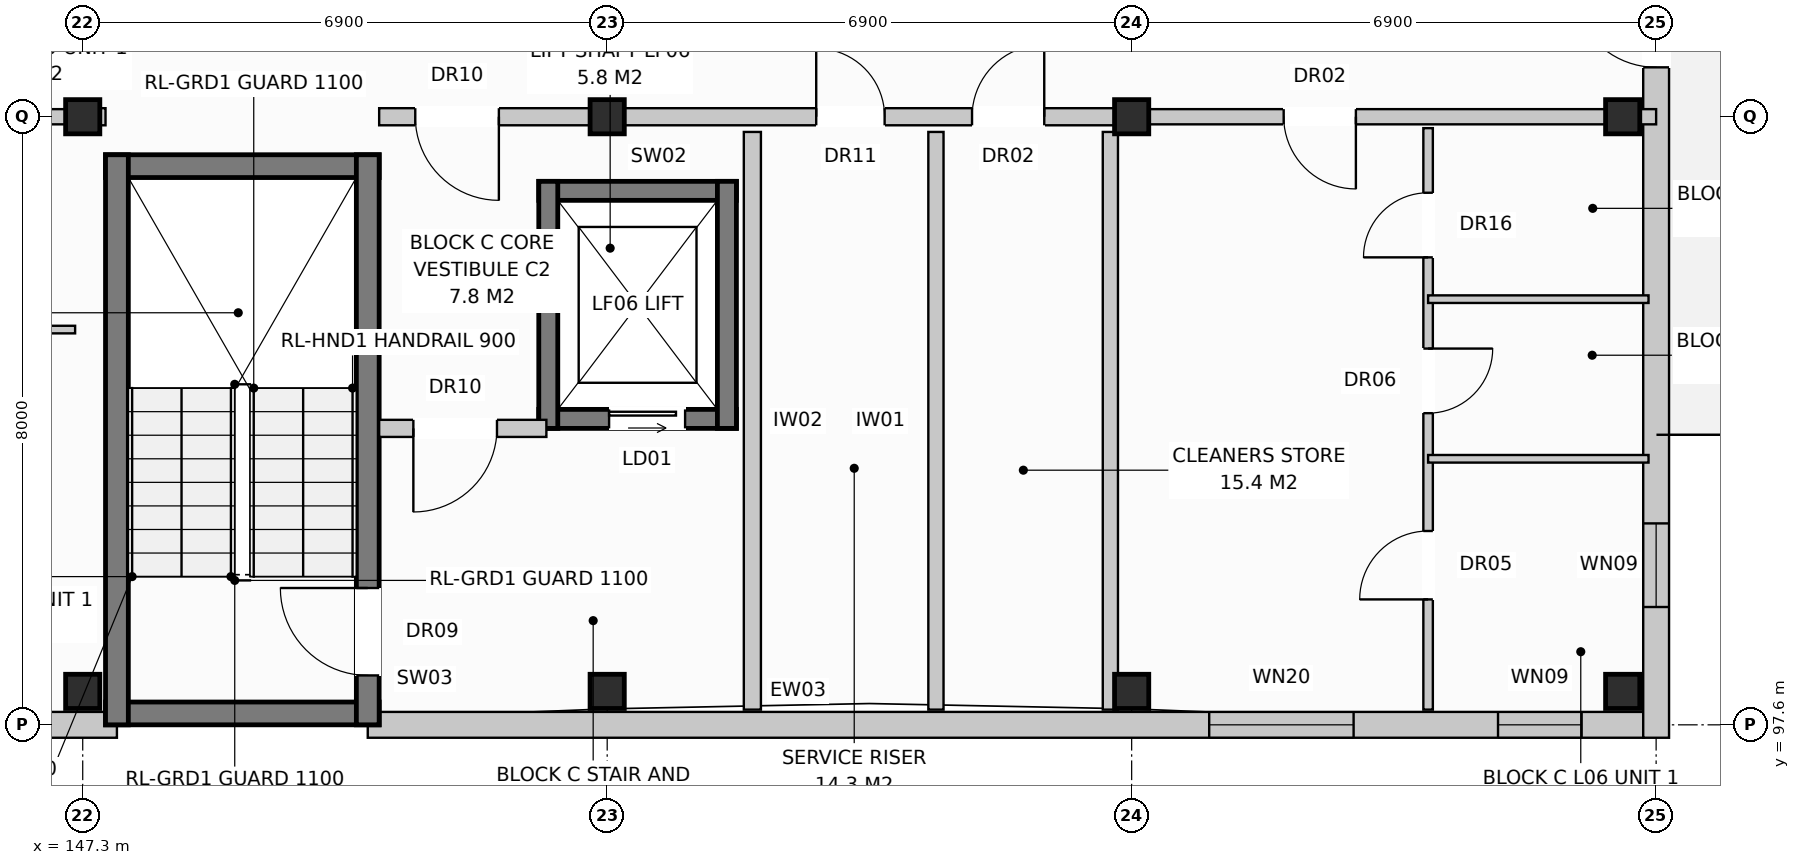
"""IFC4 building model, lengths in metres.
Left out: names, types, materials, properties, quantities, classifications, styles, units other than length and angle.
Written with IfcOpenShell. Run it as: python <this file> out.ifc"""

import sys

from ifc_helpers import new_model, si_unit, direction, frame, frame_2d, origin, origin_with_axes, origin_2d, place, context, subcontext, project, spatial, rectangle, extrude, element, fill, save


model = new_model("IFC4")
c1 = context("Model", 3, precision=1e-05, world=origin(), true_north=direction((0.0, 1.0)))
c2 = subcontext(c1, "Body", "Model", "MODEL_VIEW")
j1 = project(units=[si_unit("LENGTHUNIT", "METRE"), si_unit("PLANEANGLEUNIT", "RADIAN")], contexts=[c1])
p1 = place(None, origin())
s1 = spatial("IfcSite", under=j1, at=p1, CompositionType="ELEMENT")
p2 = place(p1, origin())
s2 = spatial("IfcBuilding", under=s1, at=p2, CompositionType="ELEMENT")
p3 = place(p2, frame((0.0, 0.0, 20.8)))
s3 = spatial("IfcBuildingStorey", under=s2, at=p3, CompositionType="ELEMENT", Elevation=20.8)
for number, where, z_axis, x_axis in (
    (1, (147.3, 98.04, 0.0), (0.0, 0.0, 1.0), (1.0, 0.0, 0.0)),
    (2, (147.3, 105.6, 0.0), (0.0, 0.0, 1.0), (1.0, 0.0, 0.0)),
    (3, (154.2, 98.04, 0.0), (0.0, 0.0, 1.0), (1.0, 0.0, 0.0)),
    (4, (154.2, 105.6, 0.0), (0.0, 0.0, 1.0), (1.0, 0.0, 0.0)),
    (5, (161.1, 98.04, 0.0), (0.0, 0.0, 1.0), (1.0, 0.0, 0.0)),
    (6, (161.1, 105.6, 0.0), (0.0, 0.0, 1.0), (1.0, 0.0, 0.0)),
    (7, (167.56, 98.04, 0.0), (0.0, 0.0, 1.0), (1.0, 0.0, 0.0)),
    (8, (167.56, 105.6, 0.0), (0.0, 0.0, 1.0), (1.0, 0.0, 0.0)),
):
    element("IfcColumn", number, at=place(p3, frame(where, z_axis=z_axis, x_axis=x_axis)), inside=s3, PredefinedType="COLUMN", context=c2, shape_type="SweptSolid", body=[
        extrude(rectangle(XDim=0.45, YDim=0.45, at=origin_2d()), origin(), (0.0, 0.0, 1.0), 3.2),
    ])
p4 = place(p3, frame((130.35, 97.6, 0.0), z_axis=(0.0, 0.0, 1.0), x_axis=(1.0, 0.0, 0.0)))
e9 = element("IfcWall", 9, at=p4, inside=s3, PredefinedType="STANDARD", context=c2, shape_type="SweptSolid", body=[
    extrude(rectangle(XDim=17.4, YDim=0.34, at=frame_2d((8.7, 0.0))), origin(), (0.0, 0.0, 1.0), 2.95),
])
p5 = place(p4, frame((11.82, 0.0, 0.0)))
e10 = element("IfcOpeningElement", 10, at=p5, cuts=e9, PredefinedType="OPENING", context=c2, shape_type="SweptSolid", body=[
    extrude(rectangle(XDim=1.05, YDim=2.12, at=frame_2d((0.525, 1.06))), frame((0.0, 0.182, 0.0), z_axis=(0.0, -1.0, 0.0), x_axis=(1.0, 0.0, 0.0)), (0.0, 0.0, 1.0), 0.364),
])
p6 = place(p4, frame((14.97, 0.0, 0.72)))
e11 = element("IfcOpeningElement", 11, at=p6, cuts=e9, PredefinedType="OPENING", context=c2, shape_type="SweptSolid", body=[
    extrude(rectangle(XDim=1.1, YDim=1.5, at=frame_2d((0.55, 0.75))), frame((0.0, 0.182, 0.0), z_axis=(0.0, -1.0, 0.0), x_axis=(1.0, 0.0, 0.0)), (0.0, 0.0, 1.0), 0.364),
])
p7 = place(p3, frame((151.05, 97.6, 0.0), z_axis=(0.0, 0.0, 1.0), x_axis=(1.0, 0.0, 0.0)))
e12 = element("IfcWall", 12, at=p7, inside=s3, PredefinedType="STANDARD", context=c2, shape_type="SweptSolid", body=[
    extrude(rectangle(XDim=16.79, YDim=0.34, at=frame_2d((8.395, 0.0))), origin(), (0.0, 0.0, 1.0), 2.95),
])
p8 = place(p7, frame((11.07, 0.0, 0.8)))
e13 = element("IfcOpeningElement", 13, at=p8, cuts=e12, PredefinedType="OPENING", context=c2, shape_type="SweptSolid", body=[
    extrude(rectangle(XDim=1.9, YDim=1.85, at=frame_2d((0.95, 0.925))), frame((0.0, 0.182, 0.0), z_axis=(0.0, -1.0, 0.0), x_axis=(1.0, 0.0, 0.0)), (0.0, 0.0, 1.0), 0.364),
])
p9 = place(p7, frame((14.87, 0.0, 0.72)))
e14 = element("IfcOpeningElement", 14, at=p9, cuts=e12, PredefinedType="OPENING", context=c2, shape_type="SweptSolid", body=[
    extrude(rectangle(XDim=1.1, YDim=1.5, at=frame_2d((0.55, 0.75))), frame((0.0, 0.182, 0.0), z_axis=(0.0, -1.0, 0.0), x_axis=(1.0, 0.0, 0.0)), (0.0, 0.0, 1.0), 0.364),
])
p10 = place(p3, frame((168.0, 97.43, 0.0), z_axis=(0.0, 0.0, 1.0), x_axis=(0.0, 1.0, 0.0)))
e15 = element("IfcWall", 15, at=p10, inside=s3, PredefinedType="STANDARD", context=c2, shape_type="SweptSolid", body=[
    extrude(rectangle(XDim=18.74, YDim=0.34, at=frame_2d((9.37, 0.0))), origin(), (0.0, 0.0, 1.0), 2.95),
])
p11 = place(p10, frame((8.82, 0.0, 0.0)))
e16 = element("IfcOpeningElement", 16, at=p11, cuts=e15, PredefinedType="OPENING", context=c2, shape_type="SweptSolid", body=[
    extrude(rectangle(XDim=1.1, YDim=2.1, at=frame_2d((0.55, 1.05))), frame((0.0, 0.182, 0.0), z_axis=(0.0, -1.0, 0.0), x_axis=(1.0, 0.0, 0.0)), (0.0, 0.0, 1.0), 0.364),
])
p12 = place(p10, frame((1.72, 0.0, 0.72)))
e17 = element("IfcOpeningElement", 17, at=p12, cuts=e15, PredefinedType="OPENING", context=c2, shape_type="SweptSolid", body=[
    extrude(rectangle(XDim=1.1, YDim=1.5, at=frame_2d((0.55, 0.75))), frame((0.0, 0.182, 0.0), z_axis=(0.0, -1.0, 0.0), x_axis=(1.0, 0.0, 0.0)), (0.0, 0.0, 1.0), 0.364),
])
p13 = place(p10, frame((15.92, 0.0, 0.72)))
e18 = element("IfcOpeningElement", 18, at=p13, cuts=e15, PredefinedType="OPENING", context=c2, shape_type="SweptSolid", body=[
    extrude(rectangle(XDim=1.1, YDim=1.5, at=frame_2d((0.55, 0.75))), frame((0.0, 0.182, 0.0), z_axis=(0.0, -1.0, 0.0), x_axis=(1.0, 0.0, 0.0)), (0.0, 0.0, 1.0), 0.364),
])
for number, where, z_axis, x_axis in (
    (19, (147.6, 97.75, 0.0), (0.0, 0.0, 1.0), (1.0, 0.0, 0.0)),
    (20, (147.6, 104.95, 0.0), (0.0, 0.0, 1.0), (1.0, 0.0, 0.0)),
):
    element("IfcWall", number, at=place(p3, frame(where, z_axis=z_axis, x_axis=x_axis)), inside=s3, PredefinedType="SHEAR", context=c2, shape_type="SweptSolid", body=[
        extrude(rectangle(XDim=3.6, YDim=0.3, at=frame_2d((1.8, 0.0))), origin(), (0.0, 0.0, 1.0), 2.95),
    ])
p14 = place(p3, frame((147.75, 97.6, 0.0), z_axis=(0.0, 0.0, 1.0), x_axis=(0.0, 1.0, 0.0)))
e21 = element("IfcWall", 21, at=p14, inside=s3, PredefinedType="SHEAR", context=c2, shape_type="SweptSolid", body=[
    extrude(rectangle(XDim=7.5, YDim=0.3, at=frame_2d((3.75, 0.0))), origin(), (0.0, 0.0, 1.0), 2.95),
])
p15 = place(p3, frame((151.05, 97.6, 0.0), z_axis=(0.0, 0.0, 1.0), x_axis=(0.0, 1.0, 0.0)))
e22 = element("IfcWall", 22, at=p15, inside=s3, PredefinedType="SHEAR", context=c2, shape_type="SweptSolid", body=[
    extrude(rectangle(XDim=7.5, YDim=0.3, at=frame_2d((3.75, 0.0))), origin(), (0.0, 0.0, 1.0), 2.95),
])
p16 = place(p15, frame((0.65, 0.0, 0.0)))
e23 = element("IfcOpeningElement", 23, at=p16, cuts=e22, PredefinedType="OPENING", context=c2, shape_type="SweptSolid", body=[
    extrude(rectangle(XDim=1.15, YDim=2.15, at=frame_2d((0.575, 1.075))), frame((0.0, 0.162, 0.0), z_axis=(0.0, -1.0, 0.0), x_axis=(1.0, 0.0, 0.0)), (0.0, 0.0, 1.0), 0.324),
])
p17 = place(p3, frame((153.3, 101.625, 0.0), z_axis=(0.0, 0.0, 1.0), x_axis=(1.0, 0.0, 0.0)))
e24 = element("IfcWall", 24, at=p17, inside=s3, PredefinedType="SHEAR", context=c2, shape_type="SweptSolid", body=[
    extrude(rectangle(XDim=2.6, YDim=0.25, at=frame_2d((1.3, 0.0))), origin(), (0.0, 0.0, 1.0), 2.95),
])
p18 = place(p17, frame((0.925, 0.0, 0.0)))
e25 = element("IfcOpeningElement", 25, at=p18, cuts=e24, PredefinedType="OPENING", context=c2, shape_type="SweptSolid", body=[
    extrude(rectangle(XDim=1.0, YDim=2.1, at=frame_2d((0.5, 1.05))), frame((0.0, 0.137, 0.0), z_axis=(0.0, -1.0, 0.0), x_axis=(1.0, 0.0, 0.0)), (0.0, 0.0, 1.0), 0.274),
])
p19 = place(p3, frame((153.3, 104.625, 0.0), z_axis=(0.0, 0.0, 1.0), x_axis=(1.0, 0.0, 0.0)))
e26 = element("IfcWall", 26, at=p19, inside=s3, PredefinedType="SHEAR", context=c2, shape_type="SweptSolid", body=[
    extrude(rectangle(XDim=2.6, YDim=0.25, at=frame_2d((1.3, 0.0))), origin(), (0.0, 0.0, 1.0), 2.95),
])
for number, where, z_axis, x_axis in (
    (27, (153.425, 101.5, 0.0), (0.0, 0.0, 1.0), (0.0, 1.0, 0.0)),
    (28, (155.775, 101.5, 0.0), (0.0, 0.0, 1.0), (0.0, 1.0, 0.0)),
):
    element("IfcWall", number, at=place(p3, frame(where, z_axis=z_axis, x_axis=x_axis)), inside=s3, PredefinedType="SHEAR", context=c2, shape_type="SweptSolid", body=[
        extrude(rectangle(XDim=3.25, YDim=0.25, at=frame_2d((1.625, 0.0))), origin(), (0.0, 0.0, 1.0), 2.95),
    ])
p20 = place(p3, frame((156.11, 97.8, 0.0), z_axis=(0.0, 0.0, 1.0), x_axis=(0.0, 1.0, 0.0)))
e29 = element("IfcWall", 29, at=p20, inside=s3, PredefinedType="PARTITIONING", context=c2, shape_type="SweptSolid", body=[
    extrude(rectangle(XDim=7.6, YDim=0.225, at=frame_2d((3.8, 0.0))), origin(), (0.0, 0.0, 1.0), 2.59),
])
p21 = place(p3, frame((151.2, 101.5, 0.0), z_axis=(0.0, 0.0, 1.0), x_axis=(1.0, 0.0, 0.0)))
e30 = element("IfcWall", 30, at=p21, inside=s3, PredefinedType="PARTITIONING", context=c2, shape_type="SweptSolid", body=[
    extrude(rectangle(XDim=2.2, YDim=0.225, at=frame_2d((1.1, 0.0))), origin(), (0.0, 0.0, 1.0), 2.95),
])
p22 = place(p21, frame((0.45, 0.0, 0.0)))
e31 = element("IfcOpeningElement", 31, at=p22, cuts=e30, PredefinedType="OPENING", context=c2, shape_type="SweptSolid", body=[
    extrude(rectangle(XDim=1.1, YDim=2.15, at=frame_2d((0.55, 1.075))), frame((0.0, 0.125, 0.0), z_axis=(0.0, -1.0, 0.0), x_axis=(1.0, 0.0, 0.0)), (0.0, 0.0, 1.0), 0.249),
])
p23 = place(p3, frame((147.3, 105.6, 0.0), z_axis=(0.0, 0.0, 1.0), x_axis=(1.0, 0.0, 0.0)))
e32 = element("IfcWall", 32, at=p23, inside=s3, PredefinedType="PARTITIONING", context=c2, shape_type="SweptSolid", body=[
    extrude(rectangle(XDim=0.3, YDim=0.225, at=frame_2d((0.15, 0.0))), origin(), (0.0, 0.0, 1.0), 2.95),
])
p24 = place(p3, frame((158.525, 97.8, 0.0), z_axis=(0.0, 0.0, 1.0), x_axis=(0.0, 1.0, 0.0)))
e33 = element("IfcWall", 33, at=p24, inside=s3, PredefinedType="PARTITIONING", context=c2, shape_type="SweptSolid", body=[
    extrude(rectangle(XDim=7.6, YDim=0.2, at=frame_2d((3.8, 0.0))), origin(), (0.0, 0.0, 1.0), 2.95),
])
p25 = place(p3, frame((160.82, 97.8, 0.0), z_axis=(0.0, 0.0, 1.0), x_axis=(0.0, 1.0, 0.0)))
e34 = element("IfcWall", 34, at=p25, inside=s3, PredefinedType="PARTITIONING", context=c2, shape_type="SweptSolid", body=[
    extrude(rectangle(XDim=7.6, YDim=0.2, at=frame_2d((3.8, 0.0))), origin(), (0.0, 0.0, 1.0), 2.39),
])
p26 = place(p3, frame((151.2, 105.6, 0.0), z_axis=(0.0, 0.0, 1.0), x_axis=(1.0, 0.0, 0.0)))
e35 = element("IfcWall", 35, at=p26, inside=s3, PredefinedType="PARTITIONING", context=c2, shape_type="SweptSolid", body=[
    extrude(rectangle(XDim=9.9, YDim=0.225, at=frame_2d((4.95, 0.0))), origin(), (0.0, 0.0, 1.0), 2.39),
])
p27 = place(p26, frame((0.475, 0.0, 0.0)))
e36 = element("IfcOpeningElement", 36, at=p27, cuts=e35, PredefinedType="OPENING", context=c2, shape_type="SweptSolid", body=[
    extrude(rectangle(XDim=1.1, YDim=2.15, at=frame_2d((0.55, 1.075))), frame((0.0, 0.125, 0.0), z_axis=(0.0, -1.0, 0.0), x_axis=(1.0, 0.0, 0.0)), (0.0, 0.0, 1.0), 0.249),
])
p28 = place(p26, frame((5.75, 0.0, 0.0)))
e37 = element("IfcOpeningElement", 37, at=p28, cuts=e35, PredefinedType="OPENING", context=c2, shape_type="SweptSolid", body=[
    extrude(rectangle(XDim=0.9, YDim=2.1, at=frame_2d((0.45, 1.05))), frame((0.0, 0.125, 0.0), z_axis=(0.0, -1.0, 0.0), x_axis=(1.0, 0.0, 0.0)), (0.0, 0.0, 1.0), 0.249),
])
p29 = place(p26, frame((7.8, 0.0, 0.0)))
e38 = element("IfcOpeningElement", 38, at=p29, cuts=e35, PredefinedType="OPENING", context=c2, shape_type="SweptSolid", body=[
    extrude(rectangle(XDim=0.95, YDim=2.15, at=frame_2d((0.475, 1.075))), frame((0.0, 0.125, 0.0), z_axis=(0.0, -1.0, 0.0), x_axis=(1.0, 0.0, 0.0)), (0.0, 0.0, 1.0), 0.249),
])
p30 = place(p3, frame((140.4, 105.6, 0.0), z_axis=(0.0, 0.0, 1.0), x_axis=(1.0, 0.0, 0.0)))
e39 = element("IfcWall", 39, at=p30, inside=s3, PredefinedType="PARTITIONING", context=c2, shape_type="SweptSolid", body=[
    extrude(rectangle(XDim=6.9, YDim=0.2, at=frame_2d((3.45, 0.0))), origin(), (0.0, 0.0, 1.0), 2.39),
])
p31 = place(p30, frame((2.0, 0.0, 0.0)))
e40 = element("IfcOpeningElement", 40, at=p31, cuts=e39, PredefinedType="OPENING", context=c2, shape_type="SweptSolid", body=[
    extrude(rectangle(XDim=0.95, YDim=2.15, at=frame_2d((0.475, 1.075))), frame((0.0, 0.112, 0.0), z_axis=(0.0, -1.0, 0.0), x_axis=(1.0, 0.0, 0.0)), (0.0, 0.0, 1.0), 0.224),
])
p32 = place(p3, frame((144.7, 102.8, 0.0), z_axis=(0.0, 0.0, 1.0), x_axis=(1.0, 0.0, 0.0)))
e41 = element("IfcWall", 41, at=p32, inside=s3, PredefinedType="PARTITIONING", context=c2, shape_type="SweptSolid", body=[
    extrude(rectangle(XDim=2.5, YDim=0.1, at=frame_2d((1.25, 0.0))), origin(), (0.0, 0.0, 1.0), 2.95),
])
p33 = place(p3, frame((161.1, 105.6, 0.0), z_axis=(0.0, 0.0, 1.0), x_axis=(1.0, 0.0, 0.0)))
e42 = element("IfcWall", 42, at=p33, inside=s3, PredefinedType="PARTITIONING", context=c2, shape_type="SweptSolid", body=[
    extrude(rectangle(XDim=6.9, YDim=0.2, at=frame_2d((3.45, 0.0))), origin(), (0.0, 0.0, 1.0), 2.39),
])
p34 = place(p33, frame((2.0, 0.0, 0.0)))
e43 = element("IfcOpeningElement", 43, at=p34, cuts=e42, PredefinedType="OPENING", context=c2, shape_type="SweptSolid", body=[
    extrude(rectangle(XDim=0.95, YDim=2.15, at=frame_2d((0.475, 1.075))), frame((0.0, 0.112, 0.0), z_axis=(0.0, -1.0, 0.0), x_axis=(1.0, 0.0, 0.0)), (0.0, 0.0, 1.0), 0.224),
])
p35 = place(p3, frame((165.0, 105.45, 0.0), z_axis=(0.0, 0.0, 1.0), x_axis=(0.0, -1.0, 0.0)))
e44 = element("IfcWall", 44, at=p35, inside=s3, PredefinedType="PARTITIONING", context=c2, shape_type="SweptSolid", body=[
    extrude(rectangle(XDim=7.65, YDim=0.125, at=frame_2d((3.825, 0.0))), origin(), (0.0, 0.0, 1.0), 2.95),
])
p36 = place(p35, frame((0.85, 0.0, 0.0)))
e45 = element("IfcOpeningElement", 45, at=p36, cuts=e44, PredefinedType="OPENING", context=c2, shape_type="SweptSolid", body=[
    extrude(rectangle(XDim=0.85, YDim=2.1, at=frame_2d((0.425, 1.05))), frame((0.0, 0.074, 0.0), z_axis=(0.0, -1.0, 0.0), x_axis=(1.0, 0.0, 0.0)), (0.0, 0.0, 1.0), 0.149),
])
p37 = place(p35, frame((2.9, 0.0, 0.0)))
e46 = element("IfcOpeningElement", 46, at=p37, cuts=e44, PredefinedType="OPENING", context=c2, shape_type="SweptSolid", body=[
    extrude(rectangle(XDim=0.85, YDim=2.05, at=frame_2d((0.425, 1.025))), frame((0.0, 0.074, 0.0), z_axis=(0.0, -1.0, 0.0), x_axis=(1.0, 0.0, 0.0)), (0.0, 0.0, 1.0), 0.149),
])
p38 = place(p35, frame((5.3, 0.0, 0.0)))
e47 = element("IfcOpeningElement", 47, at=p38, cuts=e44, PredefinedType="OPENING", context=c2, shape_type="SweptSolid", body=[
    extrude(rectangle(XDim=0.9, YDim=2.1, at=frame_2d((0.45, 1.05))), frame((0.0, 0.074, 0.0), z_axis=(0.0, -1.0, 0.0), x_axis=(1.0, 0.0, 0.0)), (0.0, 0.0, 1.0), 0.149),
])
for number, where, z_axis, x_axis in (
    (48, (165.0, 103.2, 0.0), (0.0, 0.0, 1.0), (1.0, 0.0, 0.0)),
    (49, (165.0, 101.1, 0.0), (0.0, 0.0, 1.0), (1.0, 0.0, 0.0)),
):
    element("IfcWall", number, at=place(p3, frame(where, z_axis=z_axis, x_axis=x_axis)), inside=s3, PredefinedType="PARTITIONING", context=c2, shape_type="SweptSolid", body=[
        extrude(rectangle(XDim=2.9, YDim=0.1, at=frame_2d((1.45, 0.0))), origin(), (0.0, 0.0, 1.0), 2.95),
    ])
p39 = place(p8, origin_with_axes())
e50 = element("IfcWindow", 50, at=p39, inside=s3, PartitioningType="SINGLE_PANEL", PredefinedType="WINDOW", context=c2, shape_type="SweptSolid", body=[
    extrude(rectangle(XDim=1.9, YDim=1.85, at=frame_2d((0.95, 0.925))), frame((0.0, 0.03, 0.0), z_axis=(0.0, -1.0, 0.0), x_axis=(1.0, 0.0, 0.0)), (0.0, 0.0, 1.0), 0.06),
])
fill(e13, e50)
p40 = place(p9, origin_with_axes())
e51 = element("IfcWindow", 51, at=p40, inside=s3, PartitioningType="SINGLE_PANEL", PredefinedType="WINDOW", context=c2, shape_type="SweptSolid", body=[
    extrude(rectangle(XDim=1.1, YDim=1.5, at=frame_2d((0.55, 0.75))), frame((0.0, 0.03, 0.0), z_axis=(0.0, -1.0, 0.0), x_axis=(1.0, 0.0, 0.0)), (0.0, 0.0, 1.0), 0.06),
])
fill(e14, e51)
p41 = place(p11, origin_with_axes())
e52 = element("IfcDoor", 52, at=p41, inside=s3, OperationType="SINGLE_SWING_RIGHT", PredefinedType="DOOR", context=c2, shape_type="SweptSolid", body=[
    extrude(rectangle(XDim=1.1, YDim=2.1, at=frame_2d((0.55, 1.05))), frame((0.0, 0.025, 0.0), z_axis=(0.0, -1.0, 0.0), x_axis=(1.0, 0.0, 0.0)), (0.0, 0.0, 1.0), 0.05),
])
fill(e16, e52)
p42 = place(p12, origin_with_axes())
e53 = element("IfcWindow", 53, at=p42, inside=s3, PartitioningType="SINGLE_PANEL", PredefinedType="WINDOW", context=c2, shape_type="SweptSolid", body=[
    extrude(rectangle(XDim=1.1, YDim=1.5, at=frame_2d((0.55, 0.75))), frame((0.0, 0.03, 0.0), z_axis=(0.0, -1.0, 0.0), x_axis=(1.0, 0.0, 0.0)), (0.0, 0.0, 1.0), 0.06),
])
fill(e17, e53)
p43 = place(p16, origin_with_axes())
e54 = element("IfcDoor", 54, at=p43, inside=s3, OperationType="SINGLE_SWING_RIGHT", PredefinedType="DOOR", context=c2, shape_type="SweptSolid", body=[
    extrude(rectangle(XDim=1.15, YDim=2.15, at=frame_2d((0.575, 1.075))), frame((0.0, 0.025, 0.0), z_axis=(0.0, -1.0, 0.0), x_axis=(1.0, 0.0, 0.0)), (0.0, 0.0, 1.0), 0.05),
])
fill(e23, e54)
p44 = place(p18, origin_with_axes())
e55 = element("IfcDoor", 55, at=p44, inside=s3, OperationType="SLIDING_TO_LEFT", PredefinedType="DOOR", context=c2, shape_type="SweptSolid", body=[
    extrude(rectangle(XDim=1.0, YDim=2.1, at=frame_2d((0.5, 1.05))), frame((0.0, 0.025, 0.0), z_axis=(0.0, -1.0, 0.0), x_axis=(1.0, 0.0, 0.0)), (0.0, 0.0, 1.0), 0.05),
])
fill(e25, e55)
p45 = place(p22, frame((1.1, 0.0, 0.0), z_axis=(0.0, 0.0, 1.0), x_axis=(-1.0, 0.0, 0.0)))
e56 = element("IfcDoor", 56, at=p45, inside=s3, OperationType="SINGLE_SWING_LEFT", PredefinedType="DOOR", context=c2, shape_type="SweptSolid", body=[
    extrude(rectangle(XDim=1.1, YDim=2.15, at=frame_2d((0.55, 1.075))), frame((0.0, 0.025, 0.0), z_axis=(0.0, -1.0, 0.0), x_axis=(1.0, 0.0, 0.0)), (0.0, 0.0, 1.0), 0.05),
])
fill(e31, e56)
p46 = place(p27, frame((1.1, 0.0, 0.0), z_axis=(0.0, 0.0, 1.0), x_axis=(-1.0, 0.0, 0.0)))
e57 = element("IfcDoor", 57, at=p46, inside=s3, OperationType="SINGLE_SWING_RIGHT", PredefinedType="DOOR", context=c2, shape_type="SweptSolid", body=[
    extrude(rectangle(XDim=1.1, YDim=2.15, at=frame_2d((0.55, 1.075))), frame((0.0, 0.025, 0.0), z_axis=(0.0, -1.0, 0.0), x_axis=(1.0, 0.0, 0.0)), (0.0, 0.0, 1.0), 0.05),
])
fill(e36, e57)
p47 = place(p28, origin_with_axes())
e58 = element("IfcDoor", 58, at=p47, inside=s3, OperationType="SINGLE_SWING_LEFT", PredefinedType="DOOR", context=c2, shape_type="SweptSolid", body=[
    extrude(rectangle(XDim=0.9, YDim=2.1, at=frame_2d((0.45, 1.05))), frame((0.0, 0.025, 0.0), z_axis=(0.0, -1.0, 0.0), x_axis=(1.0, 0.0, 0.0)), (0.0, 0.0, 1.0), 0.05),
])
fill(e37, e58)
p48 = place(p29, origin_with_axes())
e59 = element("IfcDoor", 59, at=p48, inside=s3, OperationType="SINGLE_SWING_RIGHT", PredefinedType="DOOR", context=c2, shape_type="SweptSolid", body=[
    extrude(rectangle(XDim=0.95, YDim=2.15, at=frame_2d((0.475, 1.075))), frame((0.0, 0.025, 0.0), z_axis=(0.0, -1.0, 0.0), x_axis=(1.0, 0.0, 0.0)), (0.0, 0.0, 1.0), 0.05),
])
fill(e38, e59)
p49 = place(p34, frame((0.95, 0.0, 0.0), z_axis=(0.0, 0.0, 1.0), x_axis=(-1.0, 0.0, 0.0)))
e60 = element("IfcDoor", 60, at=p49, inside=s3, OperationType="SINGLE_SWING_RIGHT", PredefinedType="DOOR", context=c2, shape_type="SweptSolid", body=[
    extrude(rectangle(XDim=0.95, YDim=2.15, at=frame_2d((0.475, 1.075))), frame((0.0, 0.025, 0.0), z_axis=(0.0, -1.0, 0.0), x_axis=(1.0, 0.0, 0.0)), (0.0, 0.0, 1.0), 0.05),
])
fill(e43, e60)
p50 = place(p36, frame((0.85, 0.0, 0.0), z_axis=(0.0, 0.0, 1.0), x_axis=(-1.0, 0.0, 0.0)))
e61 = element("IfcDoor", 61, at=p50, inside=s3, OperationType="SINGLE_SWING_RIGHT", PredefinedType="DOOR", context=c2, shape_type="SweptSolid", body=[
    extrude(rectangle(XDim=0.85, YDim=2.1, at=frame_2d((0.425, 1.05))), frame((0.0, 0.025, 0.0), z_axis=(0.0, -1.0, 0.0), x_axis=(1.0, 0.0, 0.0)), (0.0, 0.0, 1.0), 0.05),
])
fill(e45, e61)
p51 = place(p37, origin_with_axes())
e62 = element("IfcDoor", 62, at=p51, inside=s3, OperationType="SINGLE_SWING_LEFT", PredefinedType="DOOR", context=c2, shape_type="SweptSolid", body=[
    extrude(rectangle(XDim=0.85, YDim=2.05, at=frame_2d((0.425, 1.025))), frame((0.0, 0.025, 0.0), z_axis=(0.0, -1.0, 0.0), x_axis=(1.0, 0.0, 0.0)), (0.0, 0.0, 1.0), 0.05),
])
fill(e46, e62)
p52 = place(p38, frame((0.9, 0.0, 0.0), z_axis=(0.0, 0.0, 1.0), x_axis=(-1.0, 0.0, 0.0)))
e63 = element("IfcDoor", 63, at=p52, inside=s3, OperationType="SINGLE_SWING_RIGHT", PredefinedType="DOOR", context=c2, shape_type="SweptSolid", body=[
    extrude(rectangle(XDim=0.9, YDim=2.1, at=frame_2d((0.45, 1.05))), frame((0.0, 0.025, 0.0), z_axis=(0.0, -1.0, 0.0), x_axis=(1.0, 0.0, 0.0)), (0.0, 0.0, 1.0), 0.05),
])
fill(e47, e63)
save(model, sys.argv[1])
